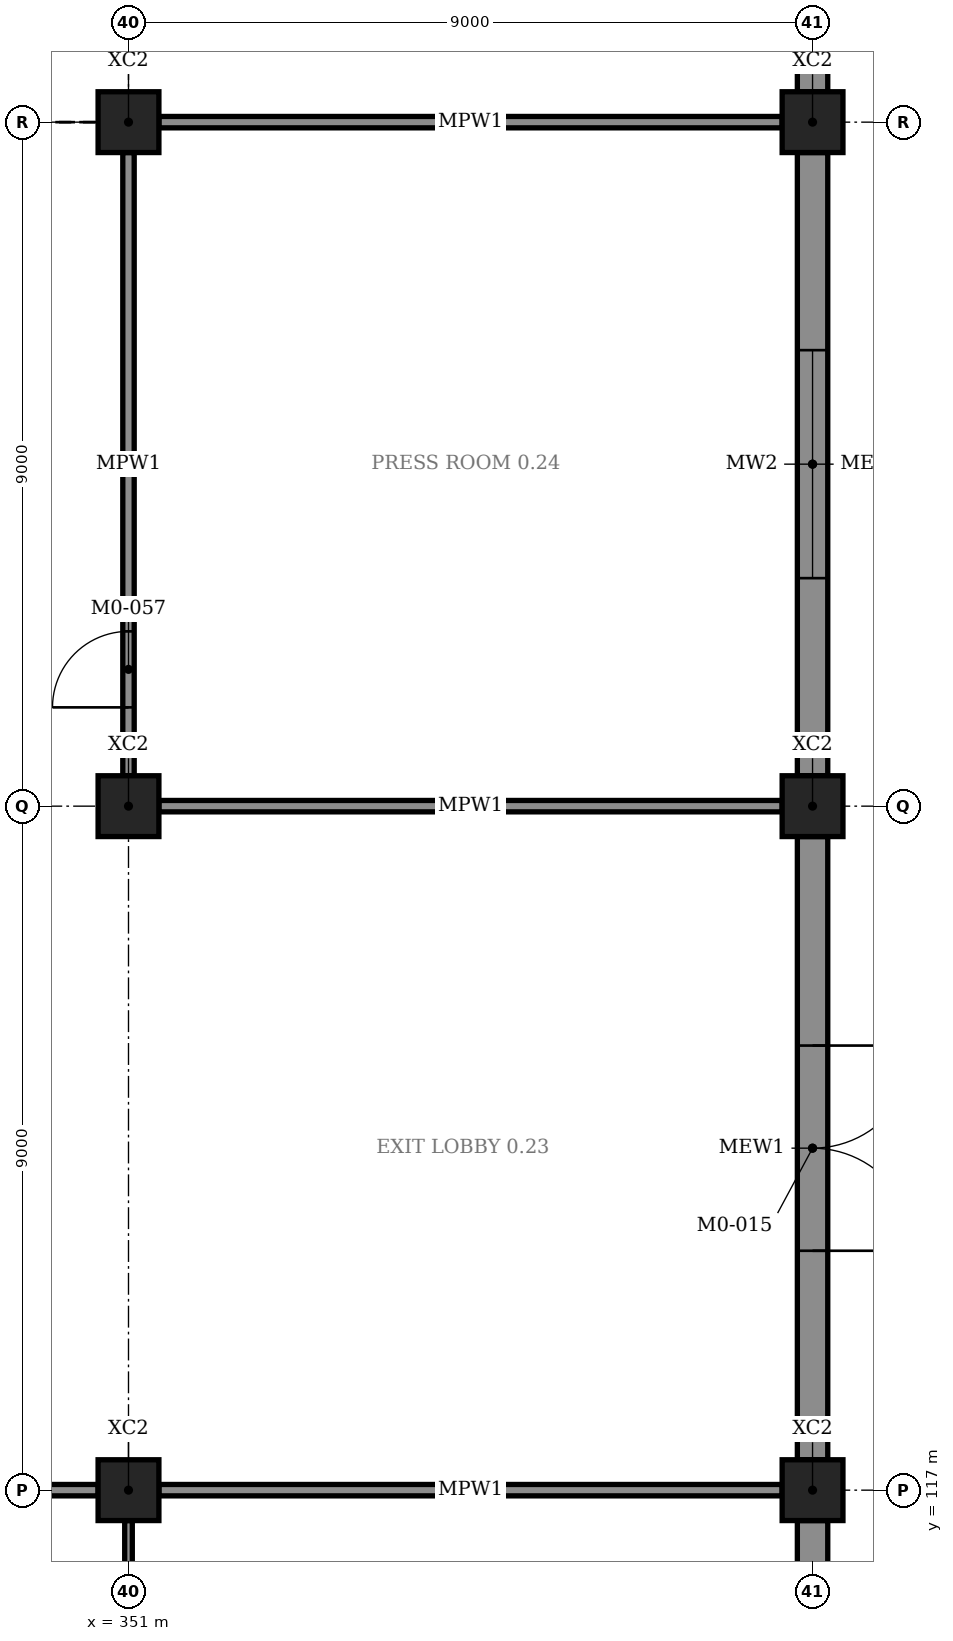
"""IFC4 building model, lengths in metres.
Left out: names, types, materials, properties, quantities, classifications, styles, units other than length and angle.
Written with IfcOpenShell. Run it as: python <this file> out.ifc"""

import sys

from ifc_helpers import new_model, si_unit, direction, frame, frame_2d, origin, origin_2d, place, context, subcontext, project, spatial, rectangle, extrude, element, fill, save


model = new_model("IFC4")
c1 = context("Model", 3, precision=1e-05, world=origin(), true_north=direction((0.0, 1.0)))
c2 = subcontext(c1, "Body", "Model", "MODEL_VIEW")
j1 = project(units=[si_unit("LENGTHUNIT", "METRE"), si_unit("PLANEANGLEUNIT", "RADIAN")], contexts=[c1])
p1 = place(None, origin())
s1 = spatial("IfcSite", under=j1, at=p1, CompositionType="ELEMENT")
p2 = place(p1, origin())
s2 = spatial("IfcBuilding", under=s1, at=p2, CompositionType="ELEMENT")
p3 = place(p2, origin())
s3 = spatial("IfcBuildingStorey", under=s2, at=p3, CompositionType="ELEMENT", Elevation=0.0)
for number, where, z_axis, x_axis in (
    (1, (351.0, 117.0, -0.3), (0.0, 0.0, 1.0), (1.0, 0.0, 0.0)),
    (2, (351.0, 126.0, -0.3), (0.0, 0.0, 1.0), (1.0, 0.0, 0.0)),
    (3, (351.0, 135.0, -0.3), (0.0, 0.0, 1.0), (1.0, 0.0, 0.0)),
    (4, (360.0, 117.0, -0.3), (0.0, 0.0, 1.0), (1.0, 0.0, 0.0)),
    (5, (360.0, 126.0, -0.3), (0.0, 0.0, 1.0), (1.0, 0.0, 0.0)),
    (6, (360.0, 135.0, -0.3), (0.0, 0.0, 1.0), (1.0, 0.0, 0.0)),
):
    element("IfcColumn", number, at=place(p3, frame(where, z_axis=z_axis, x_axis=x_axis)), inside=s3, PredefinedType="COLUMN", context=c2, shape_type="SweptSolid", body=[
        extrude(rectangle(XDim=0.8, YDim=0.8, at=origin_2d()), origin(), (0.0, 0.0, 1.0), 6.3),
    ])
p4 = place(p3, frame((360.0, 108.4, 0.0), z_axis=(0.0, 0.0, 1.0), x_axis=(0.0, 1.0, 0.0)))
e7 = element("IfcWall", 7, at=p4, inside=s3, PredefinedType="STANDARD", context=c2, shape_type="SweptSolid", body=[
    extrude(rectangle(XDim=8.2, YDim=0.4, at=frame_2d((4.1, 0.0))), origin(), (0.0, 0.0, 1.0), 4.82),
])
p5 = place(p4, frame((2.6, 0.0, 0.9)))
e8 = element("IfcOpeningElement", 8, at=p5, cuts=e7, PredefinedType="OPENING", context=c2, shape_type="SweptSolid", body=[
    extrude(rectangle(XDim=3.0, YDim=2.1, at=frame_2d((1.5, 1.05))), frame((0.0, 0.21, 0.0), z_axis=(0.0, -1.0, 0.0), x_axis=(1.0, 0.0, 0.0)), (0.0, 0.0, 1.0), 0.42),
])
p6 = place(p3, frame((360.0, 117.4, 0.0), z_axis=(0.0, 0.0, 1.0), x_axis=(0.0, 1.0, 0.0)))
e9 = element("IfcWall", 9, at=p6, inside=s3, PredefinedType="STANDARD", context=c2, shape_type="SweptSolid", body=[
    extrude(rectangle(XDim=8.2, YDim=0.4, at=frame_2d((4.1, 0.0))), origin(), (0.0, 0.0, 1.0), 4.82),
])
p7 = place(p6, frame((2.75, 0.0, 0.0)))
e10 = element("IfcOpeningElement", 10, at=p7, cuts=e9, PredefinedType="OPENING", context=c2, shape_type="SweptSolid", body=[
    extrude(rectangle(XDim=2.7, YDim=2.4, at=frame_2d((1.35, 1.2))), frame((0.0, 0.21, 0.0), z_axis=(0.0, -1.0, 0.0), x_axis=(1.0, 0.0, 0.0)), (0.0, 0.0, 1.0), 0.42),
])
p8 = place(p3, frame((360.0, 126.4, 0.0), z_axis=(0.0, 0.0, 1.0), x_axis=(0.0, 1.0, 0.0)))
e11 = element("IfcWall", 11, at=p8, inside=s3, PredefinedType="STANDARD", context=c2, shape_type="SweptSolid", body=[
    extrude(rectangle(XDim=8.2, YDim=0.4, at=frame_2d((4.1, 0.0))), origin(), (0.0, 0.0, 1.0), 4.82),
])
p9 = place(p8, frame((2.6, 0.0, 0.9)))
e12 = element("IfcOpeningElement", 12, at=p9, cuts=e11, PredefinedType="OPENING", context=c2, shape_type="SweptSolid", body=[
    extrude(rectangle(XDim=3.0, YDim=2.1, at=frame_2d((1.5, 1.05))), frame((0.0, 0.21, 0.0), z_axis=(0.0, -1.0, 0.0), x_axis=(1.0, 0.0, 0.0)), (0.0, 0.0, 1.0), 0.42),
])
p10 = place(p3, frame((360.0, 135.4, 0.0), z_axis=(0.0, 0.0, 1.0), x_axis=(0.0, 1.0, 0.0)))
e13 = element("IfcWall", 13, at=p10, inside=s3, PredefinedType="STANDARD", context=c2, shape_type="SweptSolid", body=[
    extrude(rectangle(XDim=8.2, YDim=0.4, at=frame_2d((4.1, 0.0))), origin(), (0.0, 0.0, 1.0), 4.82),
])
p11 = place(p10, frame((2.75, 0.0, 0.0)))
e14 = element("IfcOpeningElement", 14, at=p11, cuts=e13, PredefinedType="OPENING", context=c2, shape_type="SweptSolid", body=[
    extrude(rectangle(XDim=2.7, YDim=2.4, at=frame_2d((1.35, 1.2))), frame((0.0, 0.21, 0.0), z_axis=(0.0, -1.0, 0.0), x_axis=(1.0, 0.0, 0.0)), (0.0, 0.0, 1.0), 0.42),
])
p12 = place(p3, frame((342.4, 117.0, 0.0), z_axis=(0.0, 0.0, 1.0), x_axis=(1.0, 0.0, 0.0)))
e15 = element("IfcWall", 15, at=p12, inside=s3, PredefinedType="PARTITIONING", context=c2, shape_type="SweptSolid", body=[
    extrude(rectangle(XDim=8.2, YDim=0.15, at=frame_2d((4.1, 0.0))), origin(), (0.0, 0.0, 1.0), 4.82),
])
p13 = place(p12, frame((3.6, 0.0, 0.0)))
e16 = element("IfcOpeningElement", 16, at=p13, cuts=e15, PredefinedType="OPENING", context=c2, shape_type="SweptSolid", body=[
    extrude(rectangle(XDim=1.0, YDim=2.4, at=frame_2d((0.5, 1.2))), frame((0.0, 0.085, 0.0), z_axis=(0.0, -1.0, 0.0), x_axis=(1.0, 0.0, 0.0)), (0.0, 0.0, 1.0), 0.17),
])
p14 = place(p3, frame((351.0, 108.4, 0.0), z_axis=(0.0, 0.0, 1.0), x_axis=(0.0, 1.0, 0.0)))
e17 = element("IfcWall", 17, at=p14, inside=s3, PredefinedType="PARTITIONING", context=c2, shape_type="SweptSolid", body=[
    extrude(rectangle(XDim=8.2, YDim=0.1, at=frame_2d((4.1, 0.0))), origin(), (0.0, 0.0, 1.0), 4.82),
])
for number, where, z_axis, x_axis in (
    (18, (351.4, 126.0, 0.0), (0.0, 0.0, 1.0), (1.0, 0.0, 0.0)),
    (19, (351.4, 135.0, 0.0), (0.0, 0.0, 1.0), (1.0, 0.0, 0.0)),
):
    element("IfcWall", number, at=place(p3, frame(where, z_axis=z_axis, x_axis=x_axis)), inside=s3, PredefinedType="PARTITIONING", context=c2, shape_type="SweptSolid", body=[
        extrude(rectangle(XDim=8.2, YDim=0.15, at=frame_2d((4.1, 0.0))), origin(), (0.0, 0.0, 1.0), 4.82),
    ])
p15 = place(p3, frame((351.0, 126.4, 0.0), z_axis=(0.0, 0.0, 1.0), x_axis=(0.0, 1.0, 0.0)))
e20 = element("IfcWall", 20, at=p15, inside=s3, PredefinedType="PARTITIONING", context=c2, shape_type="SweptSolid", body=[
    extrude(rectangle(XDim=8.2, YDim=0.15, at=frame_2d((4.1, 0.0))), origin(), (0.0, 0.0, 1.0), 4.82),
])
p16 = place(p15, frame((0.9, 0.0, 0.0)))
e21 = element("IfcOpeningElement", 21, at=p16, cuts=e20, PredefinedType="OPENING", context=c2, shape_type="SweptSolid", body=[
    extrude(rectangle(XDim=1.0, YDim=2.4, at=frame_2d((0.5, 1.2))), frame((0.0, 0.085, 0.0), z_axis=(0.0, -1.0, 0.0), x_axis=(1.0, 0.0, 0.0)), (0.0, 0.0, 1.0), 0.17),
])
p17 = place(p3, frame((351.4, 117.0, 0.0), z_axis=(0.0, 0.0, 1.0), x_axis=(1.0, 0.0, 0.0)))
e22 = element("IfcWall", 22, at=p17, inside=s3, PredefinedType="PARTITIONING", context=c2, shape_type="SweptSolid", body=[
    extrude(rectangle(XDim=8.2, YDim=0.15, at=frame_2d((4.1, 0.0))), origin(), (0.0, 0.0, 1.0), 4.82),
])
p18 = place(p7, frame((2.7, 0.0, 0.0), z_axis=(0.0, 0.0, 1.0), x_axis=(-1.0, 0.0, 0.0)))
e23 = element("IfcDoor", 23, at=p18, inside=s3, OperationType="DOUBLE_DOOR_SINGLE_SWING", PredefinedType="DOOR", context=c2, shape_type="SweptSolid", body=[
    extrude(rectangle(XDim=2.7, YDim=2.4, at=frame_2d((1.35, 1.2))), frame((0.0, 0.025, 0.0), z_axis=(0.0, -1.0, 0.0), x_axis=(1.0, 0.0, 0.0)), (0.0, 0.0, 1.0), 0.05),
])
fill(e10, e23)
p19 = place(p9, origin())
e24 = element("IfcWindow", 24, at=p19, inside=s3, PartitioningType="TRIPLE_PANEL_VERTICAL", PredefinedType="WINDOW", context=c2, shape_type="SweptSolid", body=[
    extrude(rectangle(XDim=3.0, YDim=2.1, at=frame_2d((1.5, 1.05))), frame((0.0, 0.03, 0.0), z_axis=(0.0, -1.0, 0.0), x_axis=(1.0, 0.0, 0.0)), (0.0, 0.0, 1.0), 0.06),
])
fill(e12, e24)
p20 = place(p16, origin())
e25 = element("IfcDoor", 25, at=p20, inside=s3, OperationType="SINGLE_SWING_LEFT", PredefinedType="DOOR", context=c2, shape_type="SweptSolid", body=[
    extrude(rectangle(XDim=1.0, YDim=2.4, at=frame_2d((0.5, 1.2))), frame((0.0, 0.025, 0.0), z_axis=(0.0, -1.0, 0.0), x_axis=(1.0, 0.0, 0.0)), (0.0, 0.0, 1.0), 0.05),
])
fill(e21, e25)
save(model, sys.argv[1])
